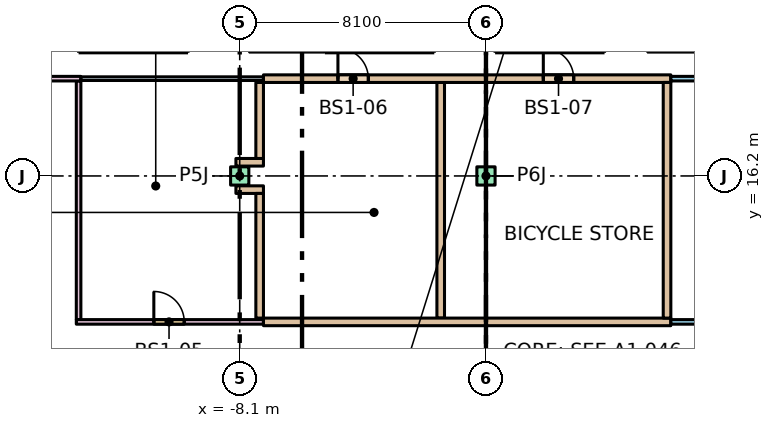
"""IFC4 building model, lengths in metres.
Left out: names, types, materials, properties, quantities, classifications, styles, units other than length and angle.
Written with IfcOpenShell. Run it as: python <this file> out.ifc"""

import sys

from ifc_helpers import new_model, si_unit, direction, frame, frame_2d, origin, origin_2d, place, context, subcontext, project, spatial, rectangle, extrude, element, fill, save


model = new_model("IFC4")
c1 = context("Model", 3, precision=1e-05, world=origin(), true_north=direction((0.0, 1.0)))
c2 = subcontext(c1, "Body", "Model", "MODEL_VIEW")
j1 = project(units=[si_unit("LENGTHUNIT", "METRE"), si_unit("PLANEANGLEUNIT", "RADIAN")], contexts=[c1])
p1 = place(None, origin())
s1 = spatial("IfcSite", under=j1, at=p1, CompositionType="ELEMENT")
p2 = place(p1, origin())
s2 = spatial("IfcBuilding", under=s1, at=p2, CompositionType="ELEMENT")
p3 = place(p2, frame((0.0, 0.0, -3.6)))
s3 = spatial("IfcBuildingStorey", under=s2, at=p3, CompositionType="ELEMENT", Elevation=-3.6)
for number, where, z_axis, x_axis in (
    (1, (-8.1, 16.2, 0.0), (0.0, 0.0, 1.0), (1.0, 0.0, 0.0)),
    (2, (0.0, 16.2, 0.0), (0.0, 0.0, 1.0), (1.0, 0.0, 0.0)),
):
    element("IfcColumn", number, at=place(p3, frame(where, z_axis=z_axis, x_axis=x_axis)), inside=s3, PredefinedType="COLUMN", context=c2, shape_type="SweptSolid", body=[
        extrude(rectangle(XDim=0.6, YDim=0.6, at=origin_2d()), origin(), (0.0, 0.0, 1.0), 3.6),
    ])
p4 = place(p3, frame((-13.4, 11.475, 0.0), z_axis=(0.0, 0.0, 1.0), x_axis=(0.0, 1.0, 0.0)))
e3 = element("IfcWall", 3, at=p4, inside=s3, PredefinedType="PARTITIONING", context=c2, shape_type="SweptSolid", body=[
    extrude(rectangle(XDim=7.85, YDim=0.15, at=frame_2d((3.925, 0.0))), origin(), (0.0, 0.0, 1.0), 3.15),
])
p5 = place(p3, frame((-17.778, 19.4, 0.0), z_axis=(0.0, 0.0, 1.0), x_axis=(1.0, 0.0, 0.0)))
e4 = element("IfcWall", 4, at=p5, inside=s3, PredefinedType="PARTITIONING", context=c2, shape_type="SweptSolid", body=[
    extrude(rectangle(XDim=4.453, YDim=0.15, at=frame_2d((2.227, 0.0))), origin(), (0.0, 0.0, 1.0), 3.15),
])
for number, where, z_axis, x_axis in (
    (5, (-8.225, 15.75, 0.0), (0.0, 0.0, 1.0), (1.0, 0.0, 0.0)),
    (6, (-8.225, 16.65, 0.0), (0.0, 0.0, 1.0), (1.0, 0.0, 0.0)),
):
    element("IfcWall", number, at=place(p3, frame(where, z_axis=z_axis, x_axis=x_axis)), inside=s3, PredefinedType="PARTITIONING", context=c2, shape_type="SweptSolid", body=[
        extrude(rectangle(XDim=0.906, YDim=0.25, at=frame_2d((0.453, 0.0))), origin(), (0.0, 0.0, 1.0), 3.15),
    ])
p6 = place(p3, frame((-7.444, 11.525, 0.0), z_axis=(0.0, 0.0, 1.0), x_axis=(0.0, 1.0, 0.0)))
e7 = element("IfcWall", 7, at=p6, inside=s3, PredefinedType="PARTITIONING", context=c2, shape_type="SweptSolid", body=[
    extrude(rectangle(XDim=4.1, YDim=0.25, at=frame_2d((2.05, 0.0))), origin(), (0.0, 0.0, 1.0), 3.15),
])
p7 = place(p3, frame((-7.444, 16.775, 0.0), z_axis=(0.0, 0.0, 1.0), x_axis=(0.0, 1.0, 0.0)))
e8 = element("IfcWall", 8, at=p7, inside=s3, PredefinedType="PARTITIONING", context=c2, shape_type="SweptSolid", body=[
    extrude(rectangle(XDim=2.5, YDim=0.25, at=frame_2d((1.25, 0.0))), origin(), (0.0, 0.0, 1.0), 3.15),
])
p8 = place(p3, frame((-13.325, 19.4, 0.0), z_axis=(0.0, 0.0, 1.0), x_axis=(1.0, 0.0, 0.0)))
e9 = element("IfcWall", 9, at=p8, inside=s3, PredefinedType="PARTITIONING", context=c2, shape_type="SweptSolid", body=[
    extrude(rectangle(XDim=6.006, YDim=0.12, at=frame_2d((3.003, 0.0))), origin(), (0.0, 0.0, 1.0), 3.15),
])
p9 = place(p3, frame((-13.475, 11.4, 0.0), z_axis=(0.0, 0.0, 1.0), x_axis=(1.0, 0.0, 0.0)))
e10 = element("IfcWall", 10, at=p9, inside=s3, PredefinedType="PARTITIONING", context=c2, shape_type="SweptSolid", body=[
    extrude(rectangle(XDim=6.156, YDim=0.15, at=frame_2d((3.078, 0.0))), origin(), (0.0, 0.0, 1.0), 3.15),
])
p10 = place(p9, frame((2.55, 0.0, 0.0)))
e11 = element("IfcOpeningElement", 11, at=p10, cuts=e10, PredefinedType="OPENING", context=c2, shape_type="SweptSolid", body=[
    extrude(rectangle(XDim=1.0, YDim=2.1, at=frame_2d((0.5, 1.05))), frame((0.0, 0.085, 0.0), z_axis=(0.0, -1.0, 0.0), x_axis=(1.0, 0.0, 0.0)), (0.0, 0.0, 1.0), 0.17),
])
p11 = place(p3, frame((-1.489, 11.525, 0.0), z_axis=(0.0, 0.0, 1.0), x_axis=(0.0, 1.0, 0.0)))
e12 = element("IfcWall", 12, at=p11, inside=s3, PredefinedType="PARTITIONING", context=c2, shape_type="SweptSolid", body=[
    extrude(rectangle(XDim=7.75, YDim=0.25, at=frame_2d((3.875, 0.0))), origin(), (0.0, 0.0, 1.0), 3.15),
])
p12 = place(p3, frame((-7.319, 19.4, 0.0), z_axis=(0.0, 0.0, 1.0), x_axis=(1.0, 0.0, 0.0)))
e13 = element("IfcWall", 13, at=p12, inside=s3, PredefinedType="PARTITIONING", context=c2, shape_type="SweptSolid", body=[
    extrude(rectangle(XDim=13.4, YDim=0.25, at=frame_2d((6.7, 0.0))), origin(), (0.0, 0.0, 1.0), 3.15),
])
p13 = place(p12, frame((2.45, 0.0, 0.0)))
e14 = element("IfcOpeningElement", 14, at=p13, cuts=e13, PredefinedType="OPENING", context=c2, shape_type="SweptSolid", body=[
    extrude(rectangle(XDim=1.0, YDim=2.1, at=frame_2d((0.5, 1.05))), frame((0.0, 0.135, 0.0), z_axis=(0.0, -1.0, 0.0), x_axis=(1.0, 0.0, 0.0)), (0.0, 0.0, 1.0), 0.27),
])
p14 = place(p12, frame((9.206, 0.0, 0.0)))
e15 = element("IfcOpeningElement", 15, at=p14, cuts=e13, PredefinedType="OPENING", context=c2, shape_type="SweptSolid", body=[
    extrude(rectangle(XDim=1.0, YDim=2.1, at=frame_2d((0.5, 1.05))), frame((0.0, 0.135, 0.0), z_axis=(0.0, -1.0, 0.0), x_axis=(1.0, 0.0, 0.0)), (0.0, 0.0, 1.0), 0.27),
])
p15 = place(p3, frame((-7.319, 11.4, 0.0), z_axis=(0.0, 0.0, 1.0), x_axis=(1.0, 0.0, 0.0)))
e16 = element("IfcWall", 16, at=p15, inside=s3, PredefinedType="PARTITIONING", context=c2, shape_type="SweptSolid", body=[
    extrude(rectangle(XDim=13.4, YDim=0.25, at=frame_2d((6.7, 0.0))), origin(), (0.0, 0.0, 1.0), 3.15),
])
p16 = place(p3, frame((5.956, 11.525, 0.0), z_axis=(0.0, 0.0, 1.0), x_axis=(0.0, 1.0, 0.0)))
e17 = element("IfcWall", 17, at=p16, inside=s3, PredefinedType="PARTITIONING", context=c2, shape_type="SweptSolid", body=[
    extrude(rectangle(XDim=7.75, YDim=0.25, at=frame_2d((3.875, 0.0))), origin(), (0.0, 0.0, 1.0), 3.15),
])
p17 = place(p3, frame((6.081, 19.4, 0.0), z_axis=(0.0, 0.0, 1.0), x_axis=(1.0, 0.0, 0.0)))
e18 = element("IfcWall", 18, at=p17, inside=s3, PredefinedType="PARTITIONING", context=c2, shape_type="SweptSolid", body=[
    extrude(rectangle(XDim=7.444, YDim=0.15, at=frame_2d((3.722, 0.0))), origin(), (0.0, 0.0, 1.0), 3.15),
])
p18 = place(p17, frame((0.95, 0.0, 0.0)))
e19 = element("IfcOpeningElement", 19, at=p18, cuts=e18, PredefinedType="OPENING", context=c2, shape_type="SweptSolid", body=[
    extrude(rectangle(XDim=1.0, YDim=2.1, at=frame_2d((0.5, 1.05))), frame((0.0, 0.085, 0.0), z_axis=(0.0, -1.0, 0.0), x_axis=(1.0, 0.0, 0.0)), (0.0, 0.0, 1.0), 0.17),
])
p19 = place(p17, frame((4.678, 0.0, 0.0)))
e20 = element("IfcOpeningElement", 20, at=p19, cuts=e18, PredefinedType="OPENING", context=c2, shape_type="SweptSolid", body=[
    extrude(rectangle(XDim=1.0, YDim=2.1, at=frame_2d((0.5, 1.05))), frame((0.0, 0.085, 0.0), z_axis=(0.0, -1.0, 0.0), x_axis=(1.0, 0.0, 0.0)), (0.0, 0.0, 1.0), 0.17),
])
p20 = place(p3, frame((6.081, 11.4, 0.0), z_axis=(0.0, 0.0, 1.0), x_axis=(1.0, 0.0, 0.0)))
e21 = element("IfcWall", 21, at=p20, inside=s3, PredefinedType="PARTITIONING", context=c2, shape_type="SweptSolid", body=[
    extrude(rectangle(XDim=7.194, YDim=0.15, at=frame_2d((3.597, 0.0))), origin(), (0.0, 0.0, 1.0), 3.15),
])
p21 = place(p10, origin())
e22 = element("IfcDoor", 22, at=p21, inside=s3, OperationType="SINGLE_SWING_LEFT", PredefinedType="DOOR", context=c2, shape_type="SweptSolid", body=[
    extrude(rectangle(XDim=1.0, YDim=2.1, at=frame_2d((0.5, 1.05))), frame((0.0, 0.025, 0.0), z_axis=(0.0, -1.0, 0.0), x_axis=(1.0, 0.0, 0.0)), (0.0, 0.0, 1.0), 0.05),
])
fill(e11, e22)
p22 = place(p13, origin())
e23 = element("IfcDoor", 23, at=p22, inside=s3, OperationType="SINGLE_SWING_LEFT", PredefinedType="DOOR", context=c2, shape_type="SweptSolid", body=[
    extrude(rectangle(XDim=1.0, YDim=2.1, at=frame_2d((0.5, 1.05))), frame((0.0, 0.025, 0.0), z_axis=(0.0, -1.0, 0.0), x_axis=(1.0, 0.0, 0.0)), (0.0, 0.0, 1.0), 0.05),
])
fill(e14, e23)
p23 = place(p14, origin())
e24 = element("IfcDoor", 24, at=p23, inside=s3, OperationType="SINGLE_SWING_LEFT", PredefinedType="DOOR", context=c2, shape_type="SweptSolid", body=[
    extrude(rectangle(XDim=1.0, YDim=2.1, at=frame_2d((0.5, 1.05))), frame((0.0, 0.025, 0.0), z_axis=(0.0, -1.0, 0.0), x_axis=(1.0, 0.0, 0.0)), (0.0, 0.0, 1.0), 0.05),
])
fill(e15, e24)
save(model, sys.argv[1])
